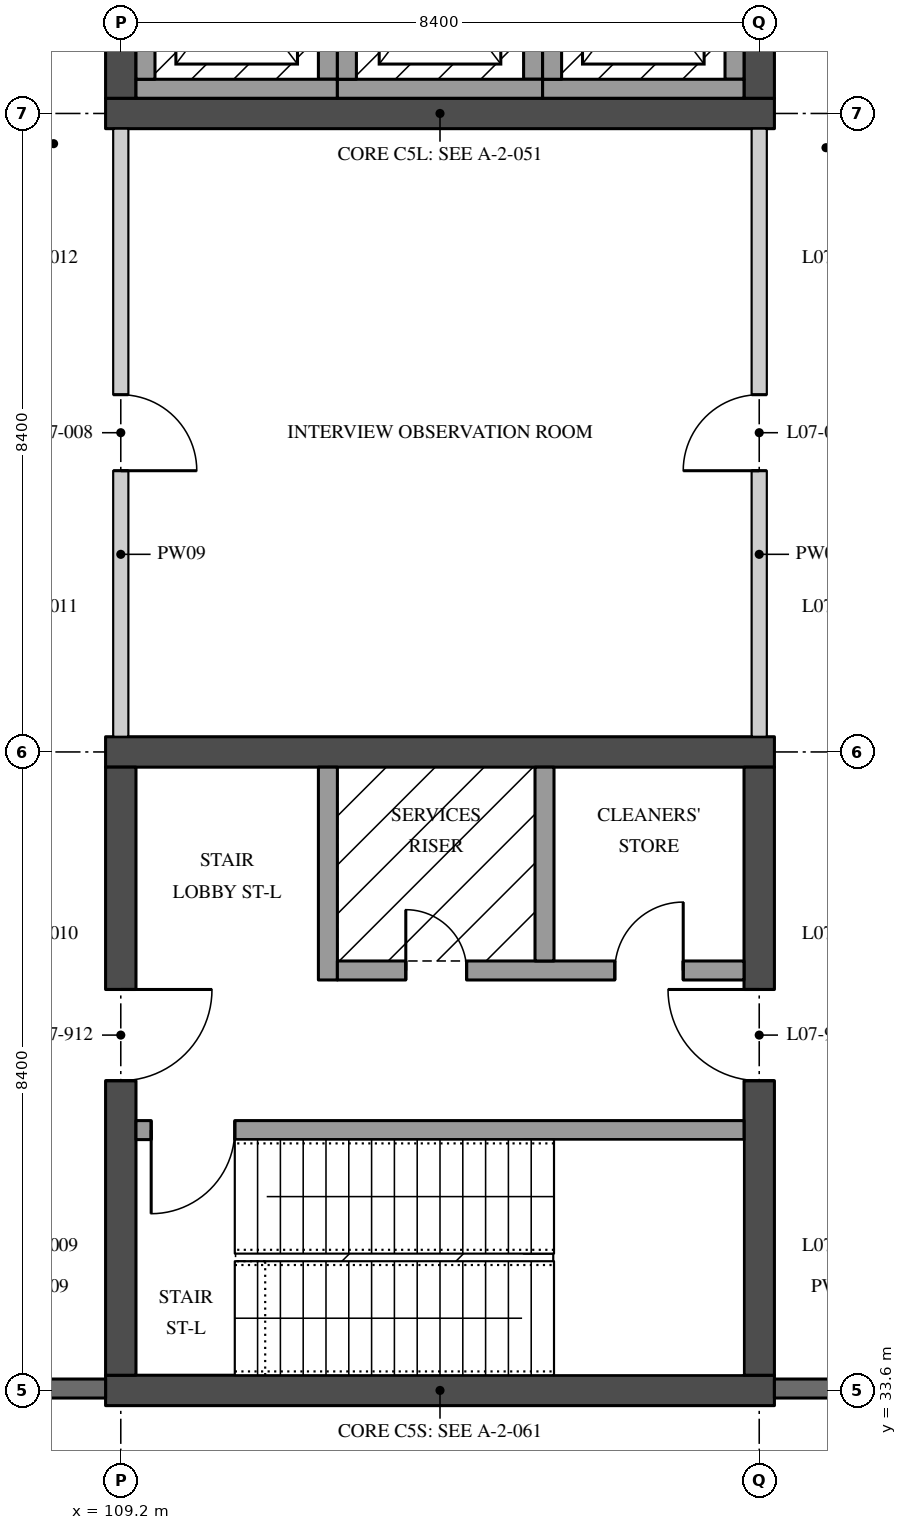
"""IFC4 building model, lengths in metres.
Left out: names, types, materials, properties, quantities, classifications, styles, units other than length and angle.
Written with IfcOpenShell. Run it as: python <this file> out.ifc"""

import sys

from ifc_helpers import new_model, si_unit, direction, frame, frame_2d, origin, place, context, subcontext, project, spatial, rectangle, extrude, element, fill, save


model = new_model("IFC4")
c1 = context("Model", 3, precision=1e-05, world=origin(), true_north=direction((0.0, 1.0)))
c2 = subcontext(c1, "Body", "Model", "MODEL_VIEW")
j1 = project(units=[si_unit("LENGTHUNIT", "METRE"), si_unit("PLANEANGLEUNIT", "RADIAN")], contexts=[c1])
p1 = place(None, origin())
s1 = spatial("IfcSite", under=j1, at=p1, CompositionType="ELEMENT")
p2 = place(p1, origin())
s2 = spatial("IfcBuilding", under=s1, at=p2, CompositionType="ELEMENT")
p3 = place(p2, frame((0.0, 0.0, 32.4)))
s3 = spatial("IfcBuildingStorey", under=s2, at=p3, CompositionType="ELEMENT", Elevation=32.4)
p4 = place(p3, frame((109.0, 50.4, 0.0), z_axis=(0.0, 0.0, 1.0), x_axis=(1.0, 0.0, 0.0)))
e1 = element("IfcWall", 1, at=p4, inside=s3, PredefinedType="SHEAR", context=c2, shape_type="SweptSolid", body=[
    extrude(rectangle(XDim=8.8, YDim=0.4, at=frame_2d((4.4, 0.0))), origin(), (0.0, 0.0, 1.0), 4.37),
])
p5 = place(p3, frame((109.2, 50.6, 0.0), z_axis=(0.0, 0.0, 1.0), x_axis=(0.0, 1.0, 0.0)))
e2 = element("IfcWall", 2, at=p5, inside=s3, PredefinedType="SHEAR", context=c2, shape_type="SweptSolid", body=[
    extrude(rectangle(XDim=8.0, YDim=0.4, at=frame_2d((4.0, 0.0))), origin(), (0.0, 0.0, 1.0), 4.37),
])
p6 = place(p5, frame((3.25, 0.0, 0.0)))
e3 = element("IfcOpeningElement", 3, at=p6, cuts=e2, PredefinedType="OPENING", context=c2, shape_type="SweptSolid", body=[
    extrude(rectangle(XDim=1.2, YDim=2.1, at=frame_2d((0.6, 1.05))), frame((0.0, 0.21, 0.0), z_axis=(0.0, -1.0, 0.0), x_axis=(1.0, 0.0, 0.0)), (0.0, 0.0, 1.0), 0.42),
])
p7 = place(p3, frame((117.6, 50.6, 0.0), z_axis=(0.0, 0.0, 1.0), x_axis=(0.0, 1.0, 0.0)))
e4 = element("IfcWall", 4, at=p7, inside=s3, PredefinedType="SHEAR", context=c2, shape_type="SweptSolid", body=[
    extrude(rectangle(XDim=8.0, YDim=0.4, at=frame_2d((4.0, 0.0))), origin(), (0.0, 0.0, 1.0), 4.37),
])
p8 = place(p7, frame((3.25, 0.0, 0.0)))
e5 = element("IfcOpeningElement", 5, at=p8, cuts=e4, PredefinedType="OPENING", context=c2, shape_type="SweptSolid", body=[
    extrude(rectangle(XDim=1.2, YDim=2.1, at=frame_2d((0.6, 1.05))), frame((0.0, 0.21, 0.0), z_axis=(0.0, -1.0, 0.0), x_axis=(1.0, 0.0, 0.0)), (0.0, 0.0, 1.0), 0.42),
])
p9 = place(p7, frame((6.0, 0.0, 0.0)))
e6 = element("IfcOpeningElement", 6, at=p9, cuts=e4, PredefinedType="OPENING", context=c2, shape_type="SweptSolid", body=[
    extrude(rectangle(XDim=1.2, YDim=2.1, at=frame_2d((0.6, 1.05))), frame((0.0, 0.21, 0.0), z_axis=(0.0, -1.0, 0.0), x_axis=(1.0, 0.0, 0.0)), (0.0, 0.0, 1.0), 0.42),
])
for number, where, z_axis, x_axis in (
    (7, (109.0, 33.6, 0.0), (0.0, 0.0, 1.0), (1.0, 0.0, 0.0)),
    (8, (109.0, 42.0, 0.0), (0.0, 0.0, 1.0), (1.0, 0.0, 0.0)),
):
    element("IfcWall", number, at=place(p3, frame(where, z_axis=z_axis, x_axis=x_axis)), inside=s3, PredefinedType="SHEAR", context=c2, shape_type="SweptSolid", body=[
        extrude(rectangle(XDim=8.8, YDim=0.4, at=frame_2d((4.4, 0.0))), origin(), (0.0, 0.0, 1.0), 4.37),
    ])
p10 = place(p3, frame((109.2, 33.8, 0.0), z_axis=(0.0, 0.0, 1.0), x_axis=(0.0, 1.0, 0.0)))
e9 = element("IfcWall", 9, at=p10, inside=s3, PredefinedType="SHEAR", context=c2, shape_type="SweptSolid", body=[
    extrude(rectangle(XDim=8.0, YDim=0.4, at=frame_2d((4.0, 0.0))), origin(), (0.0, 0.0, 1.0), 4.37),
])
p11 = place(p10, frame((3.875, 0.0, 0.0)))
e10 = element("IfcOpeningElement", 10, at=p11, cuts=e9, PredefinedType="OPENING", context=c2, shape_type="SweptSolid", body=[
    extrude(rectangle(XDim=1.2, YDim=2.1, at=frame_2d((0.6, 1.05))), frame((0.0, 0.21, 0.0), z_axis=(0.0, -1.0, 0.0), x_axis=(1.0, 0.0, 0.0)), (0.0, 0.0, 1.0), 0.42),
])
p12 = place(p3, frame((117.6, 33.8, 0.0), z_axis=(0.0, 0.0, 1.0), x_axis=(0.0, 1.0, 0.0)))
e11 = element("IfcWall", 11, at=p12, inside=s3, PredefinedType="SHEAR", context=c2, shape_type="SweptSolid", body=[
    extrude(rectangle(XDim=8.0, YDim=0.4, at=frame_2d((4.0, 0.0))), origin(), (0.0, 0.0, 1.0), 4.37),
])
p13 = place(p12, frame((3.875, 0.0, 0.0)))
e12 = element("IfcOpeningElement", 12, at=p13, cuts=e11, PredefinedType="OPENING", context=c2, shape_type="SweptSolid", body=[
    extrude(rectangle(XDim=1.2, YDim=2.1, at=frame_2d((0.6, 1.05))), frame((0.0, 0.21, 0.0), z_axis=(0.0, -1.0, 0.0), x_axis=(1.0, 0.0, 0.0)), (0.0, 0.0, 1.0), 0.42),
])
p14 = place(p3, frame((109.4, 37.025, 0.0), z_axis=(0.0, 0.0, 1.0), x_axis=(1.0, 0.0, 0.0)))
e13 = element("IfcWall", 13, at=p14, inside=s3, PredefinedType="SOLIDWALL", context=c2, shape_type="SweptSolid", body=[
    extrude(rectangle(XDim=8.0, YDim=0.25, at=frame_2d((4.0, 0.0))), origin(), (0.0, 0.0, 1.0), 4.37),
])
p15 = place(p14, frame((0.2, 0.0, 0.0)))
e14 = element("IfcOpeningElement", 14, at=p15, cuts=e13, PredefinedType="OPENING", context=c2, shape_type="SweptSolid", body=[
    extrude(rectangle(XDim=1.1, YDim=2.1, at=frame_2d((0.55, 1.05))), frame((0.0, 0.135, 0.0), z_axis=(0.0, -1.0, 0.0), x_axis=(1.0, 0.0, 0.0)), (0.0, 0.0, 1.0), 0.27),
])
p16 = place(p3, frame((111.925, 39.0, 0.0), z_axis=(0.0, 0.0, 1.0), x_axis=(0.0, 1.0, 0.0)))
e15 = element("IfcWall", 15, at=p16, inside=s3, PredefinedType="SOLIDWALL", context=c2, shape_type="SweptSolid", body=[
    extrude(rectangle(XDim=2.8, YDim=0.25, at=frame_2d((1.4, 0.0))), origin(), (0.0, 0.0, 1.0), 4.37),
])
p17 = place(p3, frame((112.05, 39.125, 0.0), z_axis=(0.0, 0.0, 1.0), x_axis=(1.0, 0.0, 0.0)))
e16 = element("IfcWall", 16, at=p17, inside=s3, PredefinedType="SOLIDWALL", context=c2, shape_type="SweptSolid", body=[
    extrude(rectangle(XDim=5.35, YDim=0.25, at=frame_2d((2.675, 0.0))), origin(), (0.0, 0.0, 1.0), 4.37),
])
p18 = place(p17, frame((3.65, 0.0, 0.0)))
e17 = element("IfcOpeningElement", 17, at=p18, cuts=e16, PredefinedType="OPENING", context=c2, shape_type="SweptSolid", body=[
    extrude(rectangle(XDim=0.9, YDim=2.1, at=frame_2d((0.45, 1.05))), frame((0.0, 0.135, 0.0), z_axis=(0.0, -1.0, 0.0), x_axis=(1.0, 0.0, 0.0)), (0.0, 0.0, 1.0), 0.27),
])
p19 = place(p17, frame((0.9, 0.0, 0.0)))
e18 = element("IfcOpeningElement", 18, at=p19, cuts=e16, PredefinedType="OPENING", context=c2, shape_type="SweptSolid", body=[
    extrude(rectangle(XDim=0.8, YDim=2.1, at=frame_2d((0.4, 1.05))), frame((0.0, 0.135, 0.0), z_axis=(0.0, -1.0, 0.0), x_axis=(1.0, 0.0, 0.0)), (0.0, 0.0, 1.0), 0.27),
])
p20 = place(p3, frame((114.775, 39.25, 0.0), z_axis=(0.0, 0.0, 1.0), x_axis=(0.0, 1.0, 0.0)))
e19 = element("IfcWall", 19, at=p20, inside=s3, PredefinedType="SOLIDWALL", context=c2, shape_type="SweptSolid", body=[
    extrude(rectangle(XDim=2.55, YDim=0.25, at=frame_2d((1.275, 0.0))), origin(), (0.0, 0.0, 1.0), 4.37),
])
p21 = place(p3, frame((111.925, 50.85, 0.0), z_axis=(0.0, 0.0, 1.0), x_axis=(0.0, 1.0, 0.0)))
e20 = element("IfcWall", 20, at=p21, inside=s3, PredefinedType="SOLIDWALL", context=c2, shape_type="SweptSolid", body=[
    extrude(rectangle(XDim=2.3, YDim=0.25, at=frame_2d((1.15, 0.0))), origin(), (0.0, 0.0, 1.0), 4.37),
])
p22 = place(p3, frame((109.4, 50.725, 0.0), z_axis=(0.0, 0.0, 1.0), x_axis=(1.0, 0.0, 0.0)))
e21 = element("IfcWall", 21, at=p22, inside=s3, PredefinedType="SOLIDWALL", context=c2, shape_type="SweptSolid", body=[
    extrude(rectangle(XDim=2.65, YDim=0.25, at=frame_2d((1.325, 0.0))), origin(), (0.0, 0.0, 1.0), 4.37),
])
for number, where, z_axis, x_axis in (
    (22, (109.525, 50.85, 0.0), (0.0, 0.0, 1.0), (0.0, 1.0, 0.0)),
    (23, (114.625, 50.85, 0.0), (0.0, 0.0, 1.0), (0.0, 1.0, 0.0)),
):
    element("IfcWall", number, at=place(p3, frame(where, z_axis=z_axis, x_axis=x_axis)), inside=s3, PredefinedType="SOLIDWALL", context=c2, shape_type="SweptSolid", body=[
        extrude(rectangle(XDim=2.3, YDim=0.25, at=frame_2d((1.15, 0.0))), origin(), (0.0, 0.0, 1.0), 4.37),
    ])
p23 = place(p3, frame((112.05, 50.725, 0.0), z_axis=(0.0, 0.0, 1.0), x_axis=(1.0, 0.0, 0.0)))
e24 = element("IfcWall", 24, at=p23, inside=s3, PredefinedType="SOLIDWALL", context=c2, shape_type="SweptSolid", body=[
    extrude(rectangle(XDim=2.7, YDim=0.25, at=frame_2d((1.35, 0.0))), origin(), (0.0, 0.0, 1.0), 4.37),
])
for number, where, z_axis, x_axis in (
    (25, (112.175, 50.85, 0.0), (0.0, 0.0, 1.0), (0.0, 1.0, 0.0)),
    (26, (117.275, 50.85, 0.0), (0.0, 0.0, 1.0), (0.0, 1.0, 0.0)),
):
    element("IfcWall", number, at=place(p3, frame(where, z_axis=z_axis, x_axis=x_axis)), inside=s3, PredefinedType="SOLIDWALL", context=c2, shape_type="SweptSolid", body=[
        extrude(rectangle(XDim=2.3, YDim=0.25, at=frame_2d((1.15, 0.0))), origin(), (0.0, 0.0, 1.0), 4.37),
    ])
p24 = place(p3, frame((114.75, 50.725, 0.0), z_axis=(0.0, 0.0, 1.0), x_axis=(1.0, 0.0, 0.0)))
e27 = element("IfcWall", 27, at=p24, inside=s3, PredefinedType="SOLIDWALL", context=c2, shape_type="SweptSolid", body=[
    extrude(rectangle(XDim=2.65, YDim=0.25, at=frame_2d((1.325, 0.0))), origin(), (0.0, 0.0, 1.0), 4.37),
])
p25 = place(p3, frame((114.875, 50.85, 0.0), z_axis=(0.0, 0.0, 1.0), x_axis=(0.0, 1.0, 0.0)))
e28 = element("IfcWall", 28, at=p25, inside=s3, PredefinedType="SOLIDWALL", context=c2, shape_type="SweptSolid", body=[
    extrude(rectangle(XDim=2.3, YDim=0.25, at=frame_2d((1.15, 0.0))), origin(), (0.0, 0.0, 1.0), 4.37),
])
p26 = place(p3, frame((117.6, 42.2, 0.0), z_axis=(0.0, 0.0, 1.0), x_axis=(0.0, 1.0, 0.0)))
e29 = element("IfcWall", 29, at=p26, inside=s3, PredefinedType="PARTITIONING", context=c2, shape_type="SweptSolid", body=[
    extrude(rectangle(XDim=8.0, YDim=0.2, at=frame_2d((4.0, 0.0))), origin(), (0.0, 0.0, 1.0), 3.746),
])
p27 = place(p26, frame((3.5, 0.0, 0.0)))
e30 = element("IfcOpeningElement", 30, at=p27, cuts=e29, PredefinedType="OPENING", context=c2, shape_type="SweptSolid", body=[
    extrude(rectangle(XDim=1.0, YDim=2.1, at=frame_2d((0.5, 1.05))), frame((0.0, 0.11, 0.0), z_axis=(0.0, -1.0, 0.0), x_axis=(1.0, 0.0, 0.0)), (0.0, 0.0, 1.0), 0.22),
])
p28 = place(p3, frame((109.2, 42.2, 0.0), z_axis=(0.0, 0.0, 1.0), x_axis=(0.0, 1.0, 0.0)))
e31 = element("IfcWall", 31, at=p28, inside=s3, PredefinedType="PARTITIONING", context=c2, shape_type="SweptSolid", body=[
    extrude(rectangle(XDim=8.0, YDim=0.2, at=frame_2d((4.0, 0.0))), origin(), (0.0, 0.0, 1.0), 3.746),
])
p29 = place(p28, frame((3.5, 0.0, 0.0)))
e32 = element("IfcOpeningElement", 32, at=p29, cuts=e31, PredefinedType="OPENING", context=c2, shape_type="SweptSolid", body=[
    extrude(rectangle(XDim=1.0, YDim=2.1, at=frame_2d((0.5, 1.05))), frame((0.0, 0.11, 0.0), z_axis=(0.0, -1.0, 0.0), x_axis=(1.0, 0.0, 0.0)), (0.0, 0.0, 1.0), 0.22),
])
p30 = place(p3, frame((100.804, 33.625, 0.0), z_axis=(0.0, 0.0, 1.0), x_axis=(1.0, 0.0, 0.0)))
e33 = element("IfcWall", 33, at=p30, inside=s3, PredefinedType="SOLIDWALL", context=c2, shape_type="SweptSolid", body=[
    extrude(rectangle(XDim=8.196, YDim=0.25, at=frame_2d((4.098, 0.0))), origin(), (0.0, 0.0, 1.0), 3.746),
])
p31 = place(p30, frame((1.496, 0.0, 2.1)))
e34 = element("IfcOpeningElement", 34, at=p31, cuts=e33, PredefinedType="OPENING", context=c2, shape_type="SweptSolid", body=[
    extrude(rectangle(XDim=1.2, YDim=0.45, at=frame_2d((0.6, 0.225))), frame((0.0, 0.135, 0.0), z_axis=(0.0, -1.0, 0.0), x_axis=(1.0, 0.0, 0.0)), (0.0, 0.0, 1.0), 0.27),
])
p32 = place(p3, frame((117.8, 33.625, 0.0), z_axis=(0.0, 0.0, 1.0), x_axis=(1.0, 0.0, 0.0)))
e35 = element("IfcWall", 35, at=p32, inside=s3, PredefinedType="SOLIDWALL", context=c2, shape_type="SweptSolid", body=[
    extrude(rectangle(XDim=8.197, YDim=0.25, at=frame_2d((4.099, 0.0))), origin(), (0.0, 0.0, 1.0), 3.746),
])
p33 = place(p32, frame((5.5, 0.0, 2.1)))
e36 = element("IfcOpeningElement", 36, at=p33, cuts=e35, PredefinedType="OPENING", context=c2, shape_type="SweptSolid", body=[
    extrude(rectangle(XDim=1.2, YDim=0.45, at=frame_2d((0.6, 0.225))), frame((0.0, 0.135, 0.0), z_axis=(0.0, -1.0, 0.0), x_axis=(1.0, 0.0, 0.0)), (0.0, 0.0, 1.0), 0.27),
])
p34 = place(p18, origin())
e37 = element("IfcDoor", 37, at=p34, inside=s3, OperationType="SINGLE_SWING_LEFT", PredefinedType="DOOR", context=c2, shape_type="SweptSolid", body=[
    extrude(rectangle(XDim=0.9, YDim=2.1, at=frame_2d((0.45, 1.05))), frame((0.0, 0.035, 0.0), z_axis=(0.0, -1.0, 0.0), x_axis=(1.0, 0.0, 0.0)), (0.0, 0.0, 1.0), 0.07),
])
fill(e17, e37)
p35 = place(p11, frame((1.2, 0.0, 0.0), z_axis=(0.0, 0.0, 1.0), x_axis=(-1.0, 0.0, 0.0)))
e38 = element("IfcDoor", 38, at=p35, inside=s3, OperationType="SINGLE_SWING_RIGHT", PredefinedType="DOOR", context=c2, shape_type="SweptSolid", body=[
    extrude(rectangle(XDim=1.2, YDim=2.1, at=frame_2d((0.6, 1.05))), frame((0.0, 0.035, 0.0), z_axis=(0.0, -1.0, 0.0), x_axis=(1.0, 0.0, 0.0)), (0.0, 0.0, 1.0), 0.07),
])
fill(e10, e38)
p36 = place(p13, origin())
e39 = element("IfcDoor", 39, at=p36, inside=s3, OperationType="SINGLE_SWING_LEFT", PredefinedType="DOOR", context=c2, shape_type="SweptSolid", body=[
    extrude(rectangle(XDim=1.2, YDim=2.1, at=frame_2d((0.6, 1.05))), frame((0.0, 0.035, 0.0), z_axis=(0.0, -1.0, 0.0), x_axis=(1.0, 0.0, 0.0)), (0.0, 0.0, 1.0), 0.07),
])
fill(e12, e39)
p37 = place(p19, origin())
e40 = element("IfcDoor", 40, at=p37, inside=s3, OperationType="SINGLE_SWING_RIGHT", PredefinedType="DOOR", context=c2, shape_type="SweptSolid", body=[
    extrude(rectangle(XDim=0.8, YDim=2.1, at=frame_2d((0.4, 1.05))), frame((0.0, 0.035, 0.0), z_axis=(0.0, -1.0, 0.0), x_axis=(1.0, 0.0, 0.0)), (0.0, 0.0, 1.0), 0.07),
])
fill(e18, e40)
p38 = place(p15, frame((1.1, 0.0, 0.0), z_axis=(0.0, 0.0, 1.0), x_axis=(-1.0, 0.0, 0.0)))
e41 = element("IfcDoor", 41, at=p38, inside=s3, OperationType="SINGLE_SWING_LEFT", PredefinedType="DOOR", context=c2, shape_type="SweptSolid", body=[
    extrude(rectangle(XDim=1.1, YDim=2.1, at=frame_2d((0.55, 1.05))), frame((0.0, 0.035, 0.0), z_axis=(0.0, -1.0, 0.0), x_axis=(1.0, 0.0, 0.0)), (0.0, 0.0, 1.0), 0.07),
])
fill(e14, e41)
p39 = place(p27, origin())
e42 = element("IfcDoor", 42, at=p39, inside=s3, OperationType="SINGLE_SWING_RIGHT", PredefinedType="DOOR", context=c2, shape_type="SweptSolid", body=[
    extrude(rectangle(XDim=1.0, YDim=2.1, at=frame_2d((0.5, 1.05))), frame((0.0, 0.045, 0.0), z_axis=(0.0, -1.0, 0.0), x_axis=(1.0, 0.0, 0.0)), (0.0, 0.0, 1.0), 0.09),
])
fill(e30, e42)
p40 = place(p29, frame((1.0, 0.0, 0.0), z_axis=(0.0, 0.0, 1.0), x_axis=(-1.0, 0.0, 0.0)))
e43 = element("IfcDoor", 43, at=p40, inside=s3, OperationType="SINGLE_SWING_LEFT", PredefinedType="DOOR", context=c2, shape_type="SweptSolid", body=[
    extrude(rectangle(XDim=1.0, YDim=2.1, at=frame_2d((0.5, 1.05))), frame((0.0, 0.045, 0.0), z_axis=(0.0, -1.0, 0.0), x_axis=(1.0, 0.0, 0.0)), (0.0, 0.0, 1.0), 0.09),
])
fill(e32, e43)
save(model, sys.argv[1])
